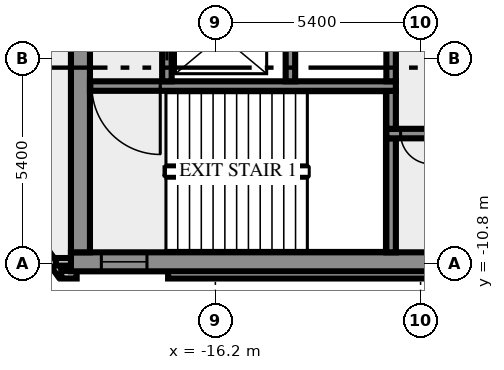
"""IFC4 building model, lengths in metres.
Left out: names, types, materials, properties, quantities, classifications, styles, units other than length and angle.
Written with IfcOpenShell. Run it as: python <this file> out.ifc"""

import sys

from ifc_helpers import new_model, si_unit, direction, frame, frame_2d, origin, place, context, subcontext, project, spatial, rectangle, extrude, element, fill, save


model = new_model("IFC4")
c1 = context("Model", 3, precision=1e-05, world=origin(), true_north=direction((0.0, 1.0)))
c2 = subcontext(c1, "Body", "Model", "MODEL_VIEW")
j1 = project(units=[si_unit("LENGTHUNIT", "METRE"), si_unit("PLANEANGLEUNIT", "RADIAN")], contexts=[c1])
p1 = place(None, origin())
s1 = spatial("IfcSite", under=j1, at=p1, CompositionType="ELEMENT")
p2 = place(p1, origin())
s2 = spatial("IfcBuilding", under=s1, at=p2, CompositionType="ELEMENT")
p3 = place(p2, frame((0.0, 0.0, 307.0)))
s3 = spatial("IfcBuildingStorey", under=s2, at=p3, CompositionType="ELEMENT", Elevation=307.0)
p4 = place(p3, frame((-21.833, -8.909, 0.0), z_axis=(0.0, 0.0, 1.0), x_axis=(0.587766567315, -0.809030569476, 0.0)))
e1 = element("IfcWall", 1, at=p4, inside=s3, PredefinedType="SOLIDWALL", context=c2, shape_type="SweptSolid", body=[
    extrude(rectangle(XDim=2.688, YDim=0.2, at=frame_2d((1.344, 0.0))), origin(), (0.0, 0.0, 1.0), 3.65),
])
p5 = place(p3, frame((-20.256, -11.088, 0.0), z_axis=(0.0, 0.0, 1.0), x_axis=(1.0, 0.0, 0.0)))
e2 = element("IfcWall", 2, at=p5, inside=s3, PredefinedType="SOLIDWALL", context=c2, shape_type="SweptSolid", body=[
    extrude(rectangle(XDim=0.406, YDim=0.2, at=frame_2d((0.203, 0.0))), origin(), (0.0, 0.0, 1.0), 3.65),
])
p6 = place(p3, frame((-17.444, -11.088, 0.0), z_axis=(0.0, 0.0, 1.0), x_axis=(1.0, 0.0, 0.0)))
e3 = element("IfcWall", 3, at=p6, inside=s3, PredefinedType="SOLIDWALL", context=c2, shape_type="SweptSolid", body=[
    extrude(rectangle(XDim=34.888, YDim=0.2, at=frame_2d((17.444, 0.0))), origin(), (0.0, 0.0, 1.0), 3.65),
])
p7 = place(p3, frame((-19.98, -10.75, 0.0), z_axis=(0.0, 0.0, 1.0), x_axis=(-1.0, 0.0, 0.0)))
e4 = element("IfcWall", 4, at=p7, inside=s3, PredefinedType="SOLIDWALL", context=c2, shape_type="SweptSolid", body=[
    extrude(rectangle(XDim=0.417, YDim=0.2, at=frame_2d((0.208, 0.0))), origin(), (0.0, 0.0, 1.0), 3.65),
])
p8 = place(p3, frame((-20.0, -10.75, 0.0), z_axis=(0.0, 0.0, 1.0), x_axis=(1.0, 0.0, 0.0)))
e5 = element("IfcWall", 5, at=p8, inside=s3, PredefinedType="SHEAR", context=c2, shape_type="SweptSolid", body=[
    extrude(rectangle(XDim=40.0, YDim=0.5, at=frame_2d((20.0, 0.0))), origin(), (0.0, 0.0, 1.0), 3.65),
])
p9 = place(p8, frame((0.8, 0.0, 1.0)))
e6 = element("IfcOpeningElement", 6, at=p9, cuts=e5, PredefinedType="OPENING", context=c2, shape_type="SweptSolid", body=[
    extrude(rectangle(XDim=1.2, YDim=1.2, at=frame_2d((0.6, 0.6))), frame((0.0, 0.26, 0.0), z_axis=(0.0, -1.0, 0.0), x_axis=(1.0, 0.0, 0.0)), (0.0, 0.0, 1.0), 0.52),
])
p10 = place(p8, frame((38.0, 0.0, 1.0)))
e7 = element("IfcOpeningElement", 7, at=p10, cuts=e5, PredefinedType="OPENING", context=c2, shape_type="SweptSolid", body=[
    extrude(rectangle(XDim=1.2, YDim=1.2, at=frame_2d((0.6, 0.6))), frame((0.0, 0.26, 0.0), z_axis=(0.0, -1.0, 0.0), x_axis=(1.0, 0.0, 0.0)), (0.0, 0.0, 1.0), 0.52),
])
p11 = place(p3, frame((-19.75, -10.5, 0.0), z_axis=(0.0, 0.0, 1.0), x_axis=(0.0, 1.0, 0.0)))
e8 = element("IfcWall", 8, at=p11, inside=s3, PredefinedType="SHEAR", context=c2, shape_type="SweptSolid", body=[
    extrude(rectangle(XDim=8.8, YDim=0.5, at=frame_2d((4.4, 0.0))), origin(), (0.0, 0.0, 1.0), 3.65),
])
p12 = place(p3, frame((-11.575, -10.5, 0.0), z_axis=(0.0, 0.0, 1.0), x_axis=(0.0, 1.0, 0.0)))
e9 = element("IfcWall", 9, at=p12, inside=s3, PredefinedType="SHEAR", context=c2, shape_type="SweptSolid", body=[
    extrude(rectangle(XDim=3.0, YDim=0.25, at=frame_2d((1.5, 0.0))), origin(), (0.0, 0.0, 1.0), 3.65),
])
p13 = place(p3, frame((11.7, -7.375, 0.0), z_axis=(0.0, 0.0, 1.0), x_axis=(-1.0, 0.0, 0.0)))
e10 = element("IfcWall", 10, at=p13, inside=s3, PredefinedType="SHEAR", context=c2, shape_type="SweptSolid", body=[
    extrude(rectangle(XDim=23.4, YDim=0.25, at=frame_2d((11.7, 0.0))), origin(), (0.0, 0.0, 1.0), 3.65),
])
p14 = place(p13, frame((22.225, 0.0, 0.0)))
e11 = element("IfcOpeningElement", 11, at=p14, cuts=e10, PredefinedType="OPENING", context=c2, shape_type="SweptSolid", body=[
    extrude(rectangle(XDim=0.8, YDim=2.1, at=frame_2d((0.4, 1.05))), frame((0.0, 0.135, 0.0), z_axis=(0.0, -1.0, 0.0), x_axis=(1.0, 0.0, 0.0)), (0.0, 0.0, 1.0), 0.27),
])
p15 = place(p13, frame((20.2, 0.0, 0.0)))
e12 = element("IfcOpeningElement", 12, at=p15, cuts=e10, PredefinedType="OPENING", context=c2, shape_type="SweptSolid", body=[
    extrude(rectangle(XDim=1.1, YDim=2.1, at=frame_2d((0.55, 1.05))), frame((0.0, 0.135, 0.0), z_axis=(0.0, -1.0, 0.0), x_axis=(1.0, 0.0, 0.0)), (0.0, 0.0, 1.0), 0.27),
])
p16 = place(p13, frame((17.7, 0.0, 0.0)))
e13 = element("IfcOpeningElement", 13, at=p16, cuts=e10, PredefinedType="OPENING", context=c2, shape_type="SweptSolid", body=[
    extrude(rectangle(XDim=1.1, YDim=2.1, at=frame_2d((0.55, 1.05))), frame((0.0, 0.135, 0.0), z_axis=(0.0, -1.0, 0.0), x_axis=(1.0, 0.0, 0.0)), (0.0, 0.0, 1.0), 0.27),
])
p17 = place(p13, frame((15.975, 0.0, 0.0)))
e14 = element("IfcOpeningElement", 14, at=p17, cuts=e10, PredefinedType="OPENING", context=c2, shape_type="SweptSolid", body=[
    extrude(rectangle(XDim=0.8, YDim=2.1, at=frame_2d((0.4, 1.05))), frame((0.0, 0.135, 0.0), z_axis=(0.0, -1.0, 0.0), x_axis=(1.0, 0.0, 0.0)), (0.0, 0.0, 1.0), 0.27),
])
p18 = place(p13, frame((14.65, 0.0, 0.0)))
e15 = element("IfcOpeningElement", 15, at=p18, cuts=e10, PredefinedType="OPENING", context=c2, shape_type="SweptSolid", body=[
    extrude(rectangle(XDim=0.8, YDim=2.1, at=frame_2d((0.4, 1.05))), frame((0.0, 0.135, 0.0), z_axis=(0.0, -1.0, 0.0), x_axis=(1.0, 0.0, 0.0)), (0.0, 0.0, 1.0), 0.27),
])
p19 = place(p13, frame((12.8, 0.0, 0.0)))
e16 = element("IfcOpeningElement", 16, at=p19, cuts=e10, PredefinedType="OPENING", context=c2, shape_type="SweptSolid", body=[
    extrude(rectangle(XDim=0.9, YDim=2.1, at=frame_2d((0.45, 1.05))), frame((0.0, 0.135, 0.0), z_axis=(0.0, -1.0, 0.0), x_axis=(1.0, 0.0, 0.0)), (0.0, 0.0, 1.0), 0.27),
])
p20 = place(p13, frame((10.7, 0.0, 0.0)))
e17 = element("IfcOpeningElement", 17, at=p20, cuts=e10, PredefinedType="OPENING", context=c2, shape_type="SweptSolid", body=[
    extrude(rectangle(XDim=0.9, YDim=2.1, at=frame_2d((0.45, 1.05))), frame((0.0, 0.135, 0.0), z_axis=(0.0, -1.0, 0.0), x_axis=(1.0, 0.0, 0.0)), (0.0, 0.0, 1.0), 0.27),
])
p21 = place(p13, frame((6.237, 0.0, 0.0)))
e18 = element("IfcOpeningElement", 18, at=p21, cuts=e10, PredefinedType="OPENING", context=c2, shape_type="SweptSolid", body=[
    extrude(rectangle(XDim=0.9, YDim=2.1, at=frame_2d((0.45, 1.05))), frame((0.0, 0.135, 0.0), z_axis=(0.0, -1.0, 0.0), x_axis=(1.0, 0.0, 0.0)), (0.0, 0.0, 1.0), 0.27),
])
p22 = place(p13, frame((1.263, 0.0, 0.0)))
e19 = element("IfcOpeningElement", 19, at=p22, cuts=e10, PredefinedType="OPENING", context=c2, shape_type="SweptSolid", body=[
    extrude(rectangle(XDim=0.9, YDim=2.1, at=frame_2d((0.45, 1.05))), frame((0.0, 0.135, 0.0), z_axis=(0.0, -1.0, 0.0), x_axis=(1.0, 0.0, 0.0)), (0.0, 0.0, 1.0), 0.27),
])
p23 = place(p3, frame((-11.575, -7.25, 0.0), z_axis=(0.0, 0.0, 1.0), x_axis=(0.0, 1.0, 0.0)))
e20 = element("IfcWall", 20, at=p23, inside=s3, PredefinedType="SHEAR", context=c2, shape_type="SweptSolid", body=[
    extrude(rectangle(XDim=1.0, YDim=0.25, at=frame_2d((0.5, 0.0))), origin(), (0.0, 0.0, 1.0), 3.65),
])
p24 = place(p3, frame((-11.45, -6.125, 0.0), z_axis=(0.0, 0.0, 1.0), x_axis=(-1.0, 0.0, 0.0)))
e21 = element("IfcWall", 21, at=p24, inside=s3, PredefinedType="SHEAR", context=c2, shape_type="SweptSolid", body=[
    extrude(rectangle(XDim=8.05, YDim=0.25, at=frame_2d((4.025, 0.0))), origin(), (0.0, 0.0, 1.0), 3.65),
])
p25 = place(p24, frame((6.2, 0.0, 0.0)))
e22 = element("IfcOpeningElement", 22, at=p25, cuts=e21, PredefinedType="OPENING", context=c2, shape_type="SweptSolid", body=[
    extrude(rectangle(XDim=1.8, YDim=2.1, at=frame_2d((0.9, 1.05))), frame((0.0, 0.135, 0.0), z_axis=(0.0, -1.0, 0.0), x_axis=(1.0, 0.0, 0.0)), (0.0, 0.0, 1.0), 0.27),
])
p26 = place(p3, frame((-17.475, -6.0, 0.0), z_axis=(0.0, 0.0, 1.0), x_axis=(0.0, 1.0, 0.0)))
e23 = element("IfcWall", 23, at=p26, inside=s3, PredefinedType="SHEAR", context=c2, shape_type="SweptSolid", body=[
    extrude(rectangle(XDim=4.3, YDim=0.25, at=frame_2d((2.15, 0.0))), origin(), (0.0, 0.0, 1.0), 3.65),
])
p27 = place(p26, frame((0.55, 0.0, 0.0)))
e24 = element("IfcOpeningElement", 24, at=p27, cuts=e23, PredefinedType="OPENING", context=c2, shape_type="SweptSolid", body=[
    extrude(rectangle(XDim=1.3, YDim=2.1, at=frame_2d((0.65, 1.05))), frame((0.0, 0.135, 0.0), z_axis=(0.0, -1.0, 0.0), x_axis=(1.0, 0.0, 0.0)), (0.0, 0.0, 1.0), 0.27),
])
for number, where, z_axis, x_axis in (
    (25, (-14.225, -6.0, 0.0), (0.0, 0.0, 1.0), (0.0, 1.0, 0.0)),
    (26, (-11.575, -6.0, 0.0), (0.0, 0.0, 1.0), (0.0, 1.0, 0.0)),
):
    element("IfcWall", number, at=place(p3, frame(where, z_axis=z_axis, x_axis=x_axis)), inside=s3, PredefinedType="SHEAR", context=c2, shape_type="SweptSolid", body=[
        extrude(rectangle(XDim=1.75, YDim=0.25, at=frame_2d((0.875, 0.0))), origin(), (0.0, 0.0, 1.0), 3.65),
    ])
p28 = place(p9, origin())
e27 = element("IfcWindow", 27, at=p28, inside=s3, PartitioningType="SINGLE_PANEL", PredefinedType="WINDOW", context=c2, shape_type="SweptSolid", body=[
    extrude(rectangle(XDim=1.2, YDim=1.2, at=frame_2d((0.6, 0.6))), frame((0.0, 0.03, 0.0), z_axis=(0.0, -1.0, 0.0), x_axis=(1.0, 0.0, 0.0)), (0.0, 0.0, 1.0), 0.06),
])
fill(e6, e27)
p29 = place(p14, origin())
e28 = element("IfcDoor", 28, at=p29, inside=s3, OperationType="SINGLE_SWING_RIGHT", PredefinedType="DOOR", context=c2, shape_type="SweptSolid", body=[
    extrude(rectangle(XDim=0.8, YDim=2.1, at=frame_2d((0.4, 1.05))), frame((0.0, 0.025, 0.0), z_axis=(0.0, -1.0, 0.0), x_axis=(1.0, 0.0, 0.0)), (0.0, 0.0, 1.0), 0.05),
])
fill(e11, e28)
p30 = place(p25, origin())
e29 = element("IfcDoor", 29, at=p30, inside=s3, OperationType="DOUBLE_DOOR_SINGLE_SWING", PredefinedType="DOOR", context=c2, shape_type="SweptSolid", body=[
    extrude(rectangle(XDim=1.8, YDim=2.1, at=frame_2d((0.9, 1.05))), frame((0.0, 0.025, 0.0), z_axis=(0.0, -1.0, 0.0), x_axis=(1.0, 0.0, 0.0)), (0.0, 0.0, 1.0), 0.05),
])
fill(e22, e29)
p31 = place(p27, origin())
e30 = element("IfcDoor", 30, at=p31, inside=s3, OperationType="DOUBLE_DOOR_SLIDING", PredefinedType="DOOR", context=c2, shape_type="SweptSolid", body=[
    extrude(rectangle(XDim=1.3, YDim=2.1, at=frame_2d((0.65, 1.05))), frame((0.0, 0.025, 0.0), z_axis=(0.0, -1.0, 0.0), x_axis=(1.0, 0.0, 0.0)), (0.0, 0.0, 1.0), 0.05),
])
fill(e24, e30)
save(model, sys.argv[1])
